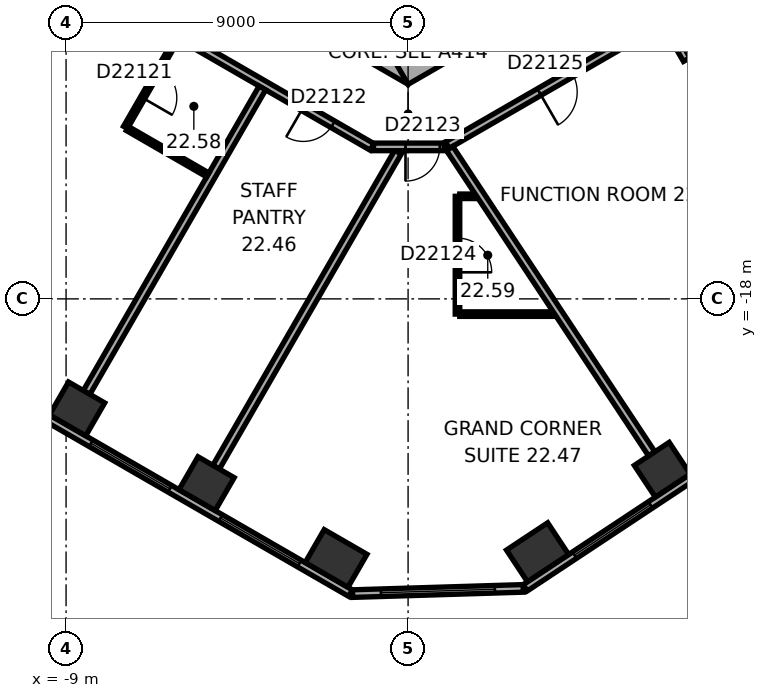
"""IFC4 building model, lengths in metres.
Left out: names, types, materials, properties, quantities, classifications, styles, units other than length and angle.
Written with IfcOpenShell. Run it as: python <this file> out.ifc"""

import sys

from ifc_helpers import new_model, si_unit, direction, frame, frame_2d, origin, origin_2d, place, context, subcontext, project, spatial, rectangle, extrude, element, fill, save


model = new_model("IFC4")
c1 = context("Model", 3, precision=1e-05, world=origin(), true_north=direction((0.0, 1.0)))
c2 = subcontext(c1, "Body", "Model", "MODEL_VIEW")
j1 = project(units=[si_unit("LENGTHUNIT", "METRE"), si_unit("PLANEANGLEUNIT", "RADIAN")], contexts=[c1])
p1 = place(None, origin())
s1 = spatial("IfcSite", under=j1, at=p1, CompositionType="ELEMENT")
p2 = place(p1, origin())
s2 = spatial("IfcBuilding", under=s1, at=p2, CompositionType="ELEMENT")
p3 = place(p2, frame((0.0, 0.0, 96.8)))
s3 = spatial("IfcBuildingStorey", under=s2, at=p3, CompositionType="ELEMENT", Elevation=96.8)
for number, where, z_axis, x_axis in (
    (1, (-8.71, -20.895, 0.0), (0.0, 0.0, 1.0), (0.866, -0.5, 0.0)),
    (2, (-5.302, -22.862, 0.0), (0.0, 0.0, 1.0), (0.866, -0.5, 0.0)),
):
    element("IfcColumn", number, at=place(p3, frame(where, z_axis=z_axis, x_axis=x_axis)), inside=s3, PredefinedType="COLUMN", context=c2, shape_type="SweptSolid", body=[
        extrude(rectangle(XDim=1.1, YDim=1.0, at=origin_2d()), origin(), (0.0, 0.0, 1.0), 3.3),
    ])
for number, where, z_axis, x_axis in (
    (3, (-1.895, -24.829, 0.0), (0.0, 0.0, 1.0), (0.866, -0.5, 0.0)),
    (4, (3.407, -24.667, 0.0), (0.0, 0.0, 1.0), (0.834, 0.552, 0.0)),
):
    element("IfcColumn", number, at=place(p3, frame(where, z_axis=z_axis, x_axis=x_axis)), inside=s3, PredefinedType="COLUMN", context=c2, shape_type="SweptSolid", body=[
        extrude(rectangle(XDim=1.3, YDim=1.0, at=origin_2d()), origin(), (0.0, 0.0, 1.0), 3.3),
    ])
p4 = place(p3, frame((6.688, -22.496, 0.0), z_axis=(0.0, 0.0, 1.0), x_axis=(0.833885822067, 0.551936985312, 0.0)))
e5 = element("IfcColumn", 5, at=p4, inside=s3, PredefinedType="COLUMN", context=c2, shape_type="SweptSolid", body=[
    extrude(rectangle(XDim=1.1, YDim=1.0, at=origin_2d()), origin(), (0.0, 0.0, 1.0), 3.3),
])
p5 = place(p3, frame((-10.4, -5.658, 0.0), z_axis=(0.0, 0.0, 1.0), x_axis=(0.866021384402, -0.500006961711, 0.0)))
e6 = element("IfcWall", 6, at=p5, inside=s3, PredefinedType="SHEAR", context=c2, shape_type="SweptSolid", body=[
    extrude(rectangle(XDim=12.355, YDim=1.2, at=frame_2d((6.178, 0.0))), origin(), (0.0, 0.0, 1.0), 3.3),
])
p6 = place(p5, frame((6.378, 0.0, 0.0)))
e7 = element("IfcOpeningElement", 7, at=p6, cuts=e6, PredefinedType="OPENING", context=c2, shape_type="SweptSolid", body=[
    extrude(rectangle(XDim=1.5, YDim=2.1, at=frame_2d((0.75, 1.05))), frame((0.0, 0.61, 0.0), z_axis=(0.0, -1.0, 0.0), x_axis=(1.0, 0.0, 0.0)), (0.0, 0.0, 1.0), 1.22),
])
p7 = place(p5, frame((3.228, 0.0, 0.0)))
e8 = element("IfcOpeningElement", 8, at=p7, cuts=e6, PredefinedType="OPENING", context=c2, shape_type="SweptSolid", body=[
    extrude(rectangle(XDim=0.9, YDim=2.1, at=frame_2d((0.45, 1.05))), frame((0.0, 0.61, 0.0), z_axis=(0.0, -1.0, 0.0), x_axis=(1.0, 0.0, 0.0)), (0.0, 0.0, 1.0), 1.22),
])
p8 = place(p3, frame((-0.3, -11.836, 0.0), z_axis=(0.0, 0.0, 1.0), x_axis=(0.866021384402, 0.500006961711, 0.0)))
e9 = element("IfcWall", 9, at=p8, inside=s3, PredefinedType="SHEAR", context=c2, shape_type="SweptSolid", body=[
    extrude(rectangle(XDim=12.355, YDim=1.2, at=frame_2d((6.178, 0.0))), origin(), (0.0, 0.0, 1.0), 3.3),
])
p9 = place(p8, frame((2.828, 0.0, 0.0)))
e10 = element("IfcOpeningElement", 10, at=p9, cuts=e9, PredefinedType="OPENING", context=c2, shape_type="SweptSolid", body=[
    extrude(rectangle(XDim=0.9, YDim=2.1, at=frame_2d((0.45, 1.05))), frame((0.0, 0.61, 0.0), z_axis=(0.0, -1.0, 0.0), x_axis=(1.0, 0.0, 0.0)), (0.0, 0.0, 1.0), 1.22),
])
p10 = place(p8, frame((5.428, 0.0, 0.0)))
e11 = element("IfcOpeningElement", 11, at=p10, cuts=e9, PredefinedType="OPENING", context=c2, shape_type="SweptSolid", body=[
    extrude(rectangle(XDim=0.9, YDim=2.1, at=frame_2d((0.45, 1.05))), frame((0.0, 0.61, 0.0), z_axis=(0.0, -1.0, 0.0), x_axis=(1.0, 0.0, 0.0)), (0.0, 0.0, 1.0), 1.22),
])
p11 = place(p8, frame((7.928, 0.0, 0.0)))
e12 = element("IfcOpeningElement", 12, at=p11, cuts=e9, PredefinedType="OPENING", context=c2, shape_type="SweptSolid", body=[
    extrude(rectangle(XDim=1.1, YDim=2.1, at=frame_2d((0.55, 1.05))), frame((0.0, 0.61, 0.0), z_axis=(0.0, -1.0, 0.0), x_axis=(1.0, 0.0, 0.0)), (0.0, 0.0, 1.0), 1.22),
])
p12 = place(p3, frame((-19.914, -15.119, 0.0), z_axis=(0.0, 0.0, 1.0), x_axis=(0.866025418898, -0.499999973822, 0.0)))
e13 = element("IfcWall", 13, at=p12, inside=s3, PredefinedType="STANDARD", context=c2, shape_type="SweptSolid", body=[
    extrude(rectangle(XDim=21.246, YDim=0.2, at=frame_2d((10.623, 0.0))), origin(), (0.0, 0.0, 1.0), 3.3),
])
p13 = place(p12, frame((1.555, 0.0, 0.8)))
e14 = element("IfcOpeningElement", 14, at=p13, cuts=e13, PredefinedType="OPENING", context=c2, shape_type="SweptSolid", body=[
    extrude(rectangle(XDim=2.4, YDim=1.7, at=frame_2d((1.2, 0.85))), frame((0.0, 0.11, 0.0), z_axis=(0.0, -1.0, 0.0), x_axis=(1.0, 0.0, 0.0)), (0.0, 0.0, 1.0), 0.22),
])
p14 = place(p12, frame((5.489, 0.0, 0.8)))
e15 = element("IfcOpeningElement", 15, at=p14, cuts=e13, PredefinedType="OPENING", context=c2, shape_type="SweptSolid", body=[
    extrude(rectangle(XDim=2.4, YDim=1.7, at=frame_2d((1.2, 0.85))), frame((0.0, 0.11, 0.0), z_axis=(0.0, -1.0, 0.0), x_axis=(1.0, 0.0, 0.0)), (0.0, 0.0, 1.0), 0.22),
])
p15 = place(p12, frame((9.424, 0.0, 0.8)))
e16 = element("IfcOpeningElement", 16, at=p15, cuts=e13, PredefinedType="OPENING", context=c2, shape_type="SweptSolid", body=[
    extrude(rectangle(XDim=2.4, YDim=1.7, at=frame_2d((1.2, 0.85))), frame((0.0, 0.11, 0.0), z_axis=(0.0, -1.0, 0.0), x_axis=(1.0, 0.0, 0.0)), (0.0, 0.0, 1.0), 0.22),
])
p16 = place(p12, frame((13.358, 0.0, 0.8)))
e17 = element("IfcOpeningElement", 17, at=p16, cuts=e13, PredefinedType="OPENING", context=c2, shape_type="SweptSolid", body=[
    extrude(rectangle(XDim=2.4, YDim=1.7, at=frame_2d((1.2, 0.85))), frame((0.0, 0.11, 0.0), z_axis=(0.0, -1.0, 0.0), x_axis=(1.0, 0.0, 0.0)), (0.0, 0.0, 1.0), 0.22),
])
p17 = place(p12, frame((17.293, 0.0, 0.8)))
e18 = element("IfcOpeningElement", 18, at=p17, cuts=e13, PredefinedType="OPENING", context=c2, shape_type="SweptSolid", body=[
    extrude(rectangle(XDim=2.4, YDim=1.7, at=frame_2d((1.2, 0.85))), frame((0.0, 0.11, 0.0), z_axis=(0.0, -1.0, 0.0), x_axis=(1.0, 0.0, 0.0)), (0.0, 0.0, 1.0), 0.22),
])
p18 = place(p3, frame((-1.461, -25.755, 0.0), z_axis=(0.0, 0.0, 1.0), x_axis=(0.999533823446, 0.030530898895, 0.0)))
e19 = element("IfcWall", 19, at=p18, inside=s3, PredefinedType="STANDARD", context=c2, shape_type="SweptSolid", body=[
    extrude(rectangle(XDim=4.494, YDim=0.2, at=frame_2d((2.247, 0.0))), origin(), (0.0, 0.0, 1.0), 3.3),
])
p19 = place(p18, frame((0.747, 0.0, 0.8)))
e20 = element("IfcOpeningElement", 20, at=p19, cuts=e19, PredefinedType="OPENING", context=c2, shape_type="SweptSolid", body=[
    extrude(rectangle(XDim=3.0, YDim=1.7, at=frame_2d((1.5, 0.85))), frame((0.0, 0.11, 0.0), z_axis=(0.0, -1.0, 0.0), x_axis=(1.0, 0.0, 0.0)), (0.0, 0.0, 1.0), 0.22),
])
p20 = place(p3, frame((3.083, -25.601, 0.0), z_axis=(0.0, 0.0, 1.0), x_axis=(0.833884295743, 0.551939291329, 0.0)))
e21 = element("IfcWall", 21, at=p20, inside=s3, PredefinedType="STANDARD", context=c2, shape_type="SweptSolid", body=[
    extrude(rectangle(XDim=21.246, YDim=0.2, at=frame_2d((10.623, 0.0))), origin(), (0.0, 0.0, 1.0), 3.3),
])
p21 = place(p20, frame((1.553, 0.0, 0.8)))
e22 = element("IfcOpeningElement", 22, at=p21, cuts=e21, PredefinedType="OPENING", context=c2, shape_type="SweptSolid", body=[
    extrude(rectangle(XDim=2.4, YDim=1.7, at=frame_2d((1.2, 0.85))), frame((0.0, 0.11, 0.0), z_axis=(0.0, -1.0, 0.0), x_axis=(1.0, 0.0, 0.0)), (0.0, 0.0, 1.0), 0.22),
])
p22 = place(p20, frame((5.488, 0.0, 0.8)))
e23 = element("IfcOpeningElement", 23, at=p22, cuts=e21, PredefinedType="OPENING", context=c2, shape_type="SweptSolid", body=[
    extrude(rectangle(XDim=2.4, YDim=1.7, at=frame_2d((1.2, 0.85))), frame((0.0, 0.11, 0.0), z_axis=(0.0, -1.0, 0.0), x_axis=(1.0, 0.0, 0.0)), (0.0, 0.0, 1.0), 0.22),
])
p23 = place(p20, frame((9.422, 0.0, 0.8)))
e24 = element("IfcOpeningElement", 24, at=p23, cuts=e21, PredefinedType="OPENING", context=c2, shape_type="SweptSolid", body=[
    extrude(rectangle(XDim=2.4, YDim=1.7, at=frame_2d((1.2, 0.85))), frame((0.0, 0.11, 0.0), z_axis=(0.0, -1.0, 0.0), x_axis=(1.0, 0.0, 0.0)), (0.0, 0.0, 1.0), 0.22),
])
p24 = place(p20, frame((13.357, 0.0, 0.8)))
e25 = element("IfcOpeningElement", 25, at=p24, cuts=e21, PredefinedType="OPENING", context=c2, shape_type="SweptSolid", body=[
    extrude(rectangle(XDim=2.4, YDim=1.7, at=frame_2d((1.2, 0.85))), frame((0.0, 0.11, 0.0), z_axis=(0.0, -1.0, 0.0), x_axis=(1.0, 0.0, 0.0)), (0.0, 0.0, 1.0), 0.22),
])
p25 = place(p20, frame((17.291, 0.0, 0.8)))
e26 = element("IfcOpeningElement", 26, at=p25, cuts=e21, PredefinedType="OPENING", context=c2, shape_type="SweptSolid", body=[
    extrude(rectangle(XDim=2.4, YDim=1.7, at=frame_2d((1.2, 0.85))), frame((0.0, 0.11, 0.0), z_axis=(0.0, -1.0, 0.0), x_axis=(1.0, 0.0, 0.0)), (0.0, 0.0, 1.0), 0.22),
])
p26 = place(p3, frame((-11.615, -7.843, 0.0), z_axis=(0.0, 0.0, 1.0), x_axis=(0.866026466995, -0.499998158461, 0.0)))
e27 = element("IfcWall", 27, at=p26, inside=s3, PredefinedType="PARTITIONING", context=c2, shape_type="SweptSolid", body=[
    extrude(rectangle(XDim=12.315, YDim=0.2, at=frame_2d((6.158, 0.0))), origin(), (0.0, 0.0, 1.0), 3.05),
])
p27 = place(p26, frame((3.333, 0.0, 0.0)))
e28 = element("IfcOpeningElement", 28, at=p27, cuts=e27, PredefinedType="OPENING", context=c2, shape_type="SweptSolid", body=[
    extrude(rectangle(XDim=0.9, YDim=2.1, at=frame_2d((0.45, 1.05))), frame((0.0, 0.11, 0.0), z_axis=(0.0, -1.0, 0.0), x_axis=(1.0, 0.0, 0.0)), (0.0, 0.0, 1.0), 0.22),
])
p28 = place(p26, frame((10.229, 0.0, 0.0)))
e29 = element("IfcOpeningElement", 29, at=p28, cuts=e27, PredefinedType="OPENING", context=c2, shape_type="SweptSolid", body=[
    extrude(rectangle(XDim=0.9, YDim=2.1, at=frame_2d((0.45, 1.05))), frame((0.0, 0.11, 0.0), z_axis=(0.0, -1.0, 0.0), x_axis=(1.0, 0.0, 0.0)), (0.0, 0.0, 1.0), 0.22),
])
p29 = place(p3, frame((-8.46, -20.461, 0.0), z_axis=(0.0, 0.0, 1.0), x_axis=(0.499999662836, 0.866025598446, 0.0)))
e30 = element("IfcWall", 30, at=p29, inside=s3, PredefinedType="PARTITIONING", context=c2, shape_type="SweptSolid", body=[
    extrude(rectangle(XDim=9.25, YDim=0.2, at=frame_2d((4.625, 0.0))), origin(), (0.0, 0.0, 1.0), 3.05),
])
p30 = place(p3, frame((-7.436, -13.489, 0.0), z_axis=(0.0, 0.0, 1.0), x_axis=(0.500048589285, 0.86599734893, 0.0)))
e31 = element("IfcWall", 31, at=p30, inside=s3, PredefinedType="PARTITIONING", context=c2, shape_type="SweptSolid", body=[
    extrude(rectangle(XDim=2.7, YDim=0.12, at=frame_2d((1.35, 0.0))), origin(), (0.0, 0.0, 1.0), 3.05),
])
p31 = place(p30, frame((0.9, 0.0, 0.0)))
e32 = element("IfcOpeningElement", 32, at=p31, cuts=e31, PredefinedType="OPENING", context=c2, shape_type="SweptSolid", body=[
    extrude(rectangle(XDim=0.9, YDim=2.1, at=frame_2d((0.45, 1.05))), frame((0.0, 0.07, 0.0), z_axis=(0.0, -1.0, 0.0), x_axis=(1.0, 0.0, 0.0)), (0.0, 0.0, 1.0), 0.14),
])
p32 = place(p3, frame((-5.271, -14.739, 0.0), z_axis=(0.0, 0.0, 1.0), x_axis=(-0.866023955769, 0.500002508028, 0.0)))
e33 = element("IfcWall", 33, at=p32, inside=s3, PredefinedType="PARTITIONING", context=c2, shape_type="SweptSolid", body=[
    extrude(rectangle(XDim=2.44, YDim=0.12, at=frame_2d((1.22, 0.0))), origin(), (0.0, 0.0, 1.0), 3.05),
])
p33 = place(p3, frame((-5.052, -22.429, 0.0), z_axis=(0.0, 0.0, 1.0), x_axis=(0.500004329283, 0.866022904257, 0.0)))
e34 = element("IfcWall", 34, at=p33, inside=s3, PredefinedType="PARTITIONING", context=c2, shape_type="SweptSolid", body=[
    extrude(rectangle(XDim=9.572, YDim=0.2, at=frame_2d((4.786, 0.0))), origin(), (0.0, 0.0, 1.0), 3.05),
])
p34 = place(p3, frame((-0.91, -14.001, 0.0), z_axis=(0.0, 0.0, 1.0), x_axis=(1.0, 0.0, 0.0)))
e35 = element("IfcWall", 35, at=p34, inside=s3, PredefinedType="PARTITIONING", context=c2, shape_type="SweptSolid", body=[
    extrude(rectangle(XDim=1.86, YDim=0.2, at=frame_2d((0.93, 0.0))), origin(), (0.0, 0.0, 1.0), 3.05),
])
p35 = place(p34, frame((0.842, 0.0, 0.0)))
e36 = element("IfcOpeningElement", 36, at=p35, cuts=e35, PredefinedType="OPENING", context=c2, shape_type="SweptSolid", body=[
    extrude(rectangle(XDim=0.9, YDim=2.1, at=frame_2d((0.45, 1.05))), frame((0.0, 0.11, 0.0), z_axis=(0.0, -1.0, 0.0), x_axis=(1.0, 0.0, 0.0)), (0.0, 0.0, 1.0), 0.22),
])
p36 = place(p3, frame((1.033, -13.953, 0.0), z_axis=(0.0, 0.0, 1.0), x_axis=(0.866017531406, 0.500013635111, 0.0)))
e37 = element("IfcWall", 37, at=p36, inside=s3, PredefinedType="PARTITIONING", context=c2, shape_type="SweptSolid", body=[
    extrude(rectangle(XDim=6.58, YDim=0.2, at=frame_2d((3.29, 0.0))), origin(), (0.0, 0.0, 1.0), 3.05),
])
p37 = place(p36, frame((2.79, 0.0, 0.0)))
e38 = element("IfcOpeningElement", 38, at=p37, cuts=e37, PredefinedType="OPENING", context=c2, shape_type="SweptSolid", body=[
    extrude(rectangle(XDim=1.0, YDim=2.1, at=frame_2d((0.5, 1.05))), frame((0.0, 0.11, 0.0), z_axis=(0.0, -1.0, 0.0), x_axis=(1.0, 0.0, 0.0)), (0.0, 0.0, 1.0), 0.22),
])
p38 = place(p3, frame((1.3, -18.401, 0.0), z_axis=(0.0, 0.0, 1.0), x_axis=(0.0, 1.0, 0.0)))
e39 = element("IfcWall", 39, at=p38, inside=s3, PredefinedType="PARTITIONING", context=c2, shape_type="SweptSolid", body=[
    extrude(rectangle(XDim=3.1, YDim=0.12, at=frame_2d((1.55, 0.0))), origin(), (0.0, 0.0, 1.0), 3.05),
])
p39 = place(p38, frame((1.1, 0.0, 0.0)))
e40 = element("IfcOpeningElement", 40, at=p39, cuts=e39, PredefinedType="OPENING", context=c2, shape_type="SweptSolid", body=[
    extrude(rectangle(XDim=0.9, YDim=2.1, at=frame_2d((0.45, 1.05))), frame((0.0, 0.07, 0.0), z_axis=(0.0, -1.0, 0.0), x_axis=(1.0, 0.0, 0.0)), (0.0, 0.0, 1.0), 0.14),
])
p40 = place(p3, frame((1.36, -15.301, 0.0), z_axis=(0.0, 0.0, 1.0), x_axis=(1.0, 0.0, 0.0)))
e41 = element("IfcWall", 41, at=p40, inside=s3, PredefinedType="PARTITIONING", context=c2, shape_type="SweptSolid", body=[
    extrude(rectangle(XDim=0.416, YDim=0.12, at=frame_2d((0.208, 0.0))), origin(), (0.0, 0.0, 1.0), 3.05),
])
p41 = place(p3, frame((3.828, -18.401, 0.0), z_axis=(0.0, 0.0, 1.0), x_axis=(-1.0, 0.0, 0.0)))
e42 = element("IfcWall", 42, at=p41, inside=s3, PredefinedType="PARTITIONING", context=c2, shape_type="SweptSolid", body=[
    extrude(rectangle(XDim=2.468, YDim=0.12, at=frame_2d((1.234, 0.0))), origin(), (0.0, 0.0, 1.0), 3.05),
])
p42 = place(p3, frame((6.412, -22.079, 0.0), z_axis=(0.0, 0.0, 1.0), x_axis=(-0.551919507115, 0.83389739037, 0.0)))
e43 = element("IfcWall", 43, at=p42, inside=s3, PredefinedType="PARTITIONING", context=c2, shape_type="SweptSolid", body=[
    extrude(rectangle(XDim=9.635, YDim=0.2, at=frame_2d((4.817, 0.0))), origin(), (0.0, 0.0, 1.0), 3.05),
])
p43 = place(p3, frame((6.782, -10.749, 0.0), z_axis=(0.0, 0.0, 1.0), x_axis=(0.500074377092, -0.865982457891, 0.0)))
e44 = element("IfcWall", 44, at=p43, inside=s3, PredefinedType="PARTITIONING", context=c2, shape_type="SweptSolid", body=[
    extrude(rectangle(XDim=1.101, YDim=0.2, at=frame_2d((0.55, 0.0))), origin(), (0.0, 0.0, 1.0), 3.05),
])
p44 = place(p16, origin())
e45 = element("IfcWindow", 45, at=p44, inside=s3, PartitioningType="SINGLE_PANEL", PredefinedType="WINDOW", context=c2, shape_type="SweptSolid", body=[
    extrude(rectangle(XDim=2.4, YDim=1.7, at=frame_2d((1.2, 0.85))), frame((0.0, 0.03, 0.0), z_axis=(0.0, -1.0, 0.0), x_axis=(1.0, 0.0, 0.0)), (0.0, 0.0, 1.0), 0.06),
])
fill(e17, e45)
p45 = place(p17, origin())
e46 = element("IfcWindow", 46, at=p45, inside=s3, PartitioningType="SINGLE_PANEL", PredefinedType="WINDOW", context=c2, shape_type="SweptSolid", body=[
    extrude(rectangle(XDim=2.4, YDim=1.7, at=frame_2d((1.2, 0.85))), frame((0.0, 0.03, 0.0), z_axis=(0.0, -1.0, 0.0), x_axis=(1.0, 0.0, 0.0)), (0.0, 0.0, 1.0), 0.06),
])
fill(e18, e46)
p46 = place(p19, origin())
e47 = element("IfcWindow", 47, at=p46, inside=s3, PartitioningType="SINGLE_PANEL", PredefinedType="WINDOW", context=c2, shape_type="SweptSolid", body=[
    extrude(rectangle(XDim=3.0, YDim=1.7, at=frame_2d((1.5, 0.85))), frame((0.0, 0.03, 0.0), z_axis=(0.0, -1.0, 0.0), x_axis=(1.0, 0.0, 0.0)), (0.0, 0.0, 1.0), 0.06),
])
fill(e20, e47)
p47 = place(p21, origin())
e48 = element("IfcWindow", 48, at=p47, inside=s3, PartitioningType="SINGLE_PANEL", PredefinedType="WINDOW", context=c2, shape_type="SweptSolid", body=[
    extrude(rectangle(XDim=2.4, YDim=1.7, at=frame_2d((1.2, 0.85))), frame((0.0, 0.03, 0.0), z_axis=(0.0, -1.0, 0.0), x_axis=(1.0, 0.0, 0.0)), (0.0, 0.0, 1.0), 0.06),
])
fill(e22, e48)
p48 = place(p31, origin())
e49 = element("IfcDoor", 49, at=p48, inside=s3, OperationType="SINGLE_SWING_LEFT", PredefinedType="DOOR", context=c2, shape_type="SweptSolid", body=[
    extrude(rectangle(XDim=0.9, YDim=2.1, at=frame_2d((0.45, 1.05))), frame((0.0, 0.025, 0.0), z_axis=(0.0, -1.0, 0.0), x_axis=(1.0, 0.0, 0.0)), (0.0, 0.0, 1.0), 0.05),
])
fill(e32, e49)
p49 = place(p28, origin())
e50 = element("IfcDoor", 50, at=p49, inside=s3, OperationType="SINGLE_SWING_LEFT", PredefinedType="DOOR", context=c2, shape_type="SweptSolid", body=[
    extrude(rectangle(XDim=0.9, YDim=2.1, at=frame_2d((0.45, 1.05))), frame((0.0, 0.025, 0.0), z_axis=(0.0, -1.0, 0.0), x_axis=(1.0, 0.0, 0.0)), (0.0, 0.0, 1.0), 0.05),
])
fill(e29, e50)
p50 = place(p35, origin())
e51 = element("IfcDoor", 51, at=p50, inside=s3, OperationType="SINGLE_SWING_LEFT", PredefinedType="DOOR", context=c2, shape_type="SweptSolid", body=[
    extrude(rectangle(XDim=0.9, YDim=2.1, at=frame_2d((0.45, 1.05))), frame((0.0, 0.025, 0.0), z_axis=(0.0, -1.0, 0.0), x_axis=(1.0, 0.0, 0.0)), (0.0, 0.0, 1.0), 0.05),
])
fill(e36, e51)
p51 = place(p39, origin())
e52 = element("IfcDoor", 52, at=p51, inside=s3, OperationType="SINGLE_SWING_LEFT", PredefinedType="DOOR", context=c2, shape_type="SweptSolid", body=[
    extrude(rectangle(XDim=0.9, YDim=2.1, at=frame_2d((0.45, 1.05))), frame((0.0, 0.025, 0.0), z_axis=(0.0, -1.0, 0.0), x_axis=(1.0, 0.0, 0.0)), (0.0, 0.0, 1.0), 0.05),
])
fill(e40, e52)
p52 = place(p37, origin())
e53 = element("IfcDoor", 53, at=p52, inside=s3, OperationType="SINGLE_SWING_LEFT", PredefinedType="DOOR", context=c2, shape_type="SweptSolid", body=[
    extrude(rectangle(XDim=1.0, YDim=2.1, at=frame_2d((0.5, 1.05))), frame((0.0, 0.025, 0.0), z_axis=(0.0, -1.0, 0.0), x_axis=(1.0, 0.0, 0.0)), (0.0, 0.0, 1.0), 0.05),
])
fill(e38, e53)
save(model, sys.argv[1])
